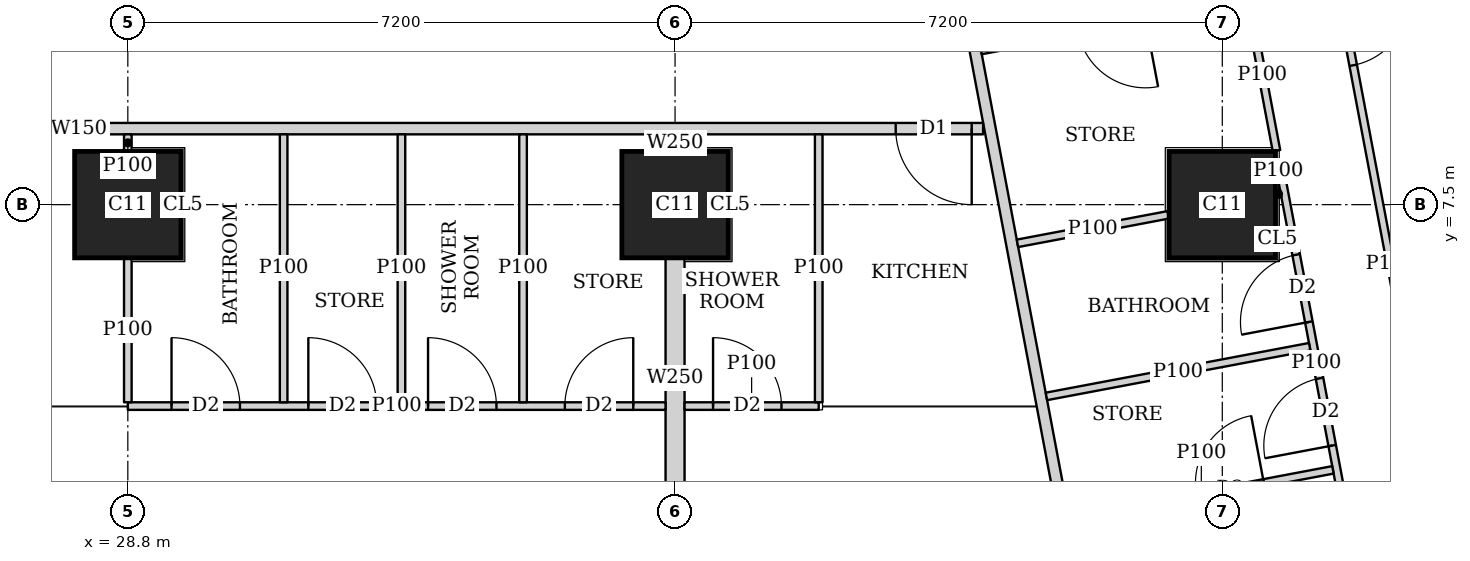
"""IFC4 building model, lengths in metres.
Left out: names, types, materials, properties, quantities, classifications, styles, units other than length and angle.
Written with IfcOpenShell. Run it as: python <this file> out.ifc"""

import sys

from ifc_helpers import new_model, si_unit, direction, frame, frame_2d, origin, origin_2d, place, context, subcontext, project, spatial, rectangle, extrude, element, fill, save


model = new_model("IFC4")
c1 = context("Model", 3, precision=1e-05, world=origin(), true_north=direction((0.0, 1.0)))
c2 = subcontext(c1, "Body", "Model", "MODEL_VIEW")
j1 = project(units=[si_unit("LENGTHUNIT", "METRE"), si_unit("PLANEANGLEUNIT", "RADIAN")], contexts=[c1])
p1 = place(None, origin())
s1 = spatial("IfcSite", under=j1, at=p1, CompositionType="ELEMENT")
p2 = place(p1, origin())
s2 = spatial("IfcBuilding", under=s1, at=p2, CompositionType="ELEMENT")
p3 = place(p2, frame((0.0, 0.0, 223.7)))
s3 = spatial("IfcBuildingStorey", under=s2, at=p3, CompositionType="ELEMENT", Elevation=223.7)
for number, where, z_axis, x_axis in (
    (1, (28.8, 7.5, 0.0), (0.0, 0.0, 1.0), (1.0, 0.0, 0.0)),
    (2, (36.0, 7.5, 0.0), (0.0, 0.0, 1.0), (1.0, 0.0, 0.0)),
    (3, (43.2, 7.5, 0.0), (0.0, 0.0, 1.0), (1.0, 0.0, 0.0)),
):
    element("IfcColumn", number, at=place(p3, frame(where, z_axis=z_axis, x_axis=x_axis)), inside=s3, PredefinedType="COLUMN", context=c2, shape_type="SweptSolid", body=[
        extrude(rectangle(XDim=1.4, YDim=1.4, at=origin_2d()), origin(), (0.0, 0.0, 1.0), 3.75),
    ])
p4 = place(p3, frame((50.653, 2.703, 0.0), z_axis=(0.0, 0.0, 1.0), x_axis=(-0.185612026696, 0.982623109613, 0.0)))
e4 = element("IfcWall", 4, at=p4, inside=s3, PredefinedType="SOLIDWALL", context=c2, shape_type="SweptSolid", body=[
    extrude(rectangle(XDim=41.393, YDim=0.2, at=frame_2d((20.697, 0.0))), origin(), (0.0, 0.0, 1.0), 3.5),
])
p5 = place(p4, frame((1.633, 0.0, 0.9)))
e5 = element("IfcOpeningElement", 5, at=p5, cuts=e4, PredefinedType="OPENING", context=c2, shape_type="SweptSolid", body=[
    extrude(rectangle(XDim=1.8, YDim=1.5, at=frame_2d((0.9, 0.75))), frame((0.0, 0.11, 0.0), z_axis=(0.0, -1.0, 0.0), x_axis=(1.0, 0.0, 0.0)), (0.0, 0.0, 1.0), 0.22),
])
p6 = place(p4, frame((6.032, 0.0, 0.9)))
e6 = element("IfcOpeningElement", 6, at=p6, cuts=e4, PredefinedType="OPENING", context=c2, shape_type="SweptSolid", body=[
    extrude(rectangle(XDim=1.8, YDim=1.5, at=frame_2d((0.9, 0.75))), frame((0.0, 0.11, 0.0), z_axis=(0.0, -1.0, 0.0), x_axis=(1.0, 0.0, 0.0)), (0.0, 0.0, 1.0), 0.22),
])
p7 = place(p4, frame((9.848, 0.0, 0.9)))
e7 = element("IfcOpeningElement", 7, at=p7, cuts=e4, PredefinedType="OPENING", context=c2, shape_type="SweptSolid", body=[
    extrude(rectangle(XDim=1.8, YDim=1.5, at=frame_2d((0.9, 0.75))), frame((0.0, 0.11, 0.0), z_axis=(0.0, -1.0, 0.0), x_axis=(1.0, 0.0, 0.0)), (0.0, 0.0, 1.0), 0.22),
])
p8 = place(p4, frame((13.664, 0.0, 0.9)))
e8 = element("IfcOpeningElement", 8, at=p8, cuts=e4, PredefinedType="OPENING", context=c2, shape_type="SweptSolid", body=[
    extrude(rectangle(XDim=1.8, YDim=1.5, at=frame_2d((0.9, 0.75))), frame((0.0, 0.11, 0.0), z_axis=(0.0, -1.0, 0.0), x_axis=(1.0, 0.0, 0.0)), (0.0, 0.0, 1.0), 0.22),
])
p9 = place(p4, frame((17.481, 0.0, 0.9)))
e9 = element("IfcOpeningElement", 9, at=p9, cuts=e4, PredefinedType="OPENING", context=c2, shape_type="SweptSolid", body=[
    extrude(rectangle(XDim=1.8, YDim=1.5, at=frame_2d((0.9, 0.75))), frame((0.0, 0.11, 0.0), z_axis=(0.0, -1.0, 0.0), x_axis=(1.0, 0.0, 0.0)), (0.0, 0.0, 1.0), 0.22),
])
p10 = place(p4, frame((21.297, 0.0, 0.9)))
e10 = element("IfcOpeningElement", 10, at=p10, cuts=e4, PredefinedType="OPENING", context=c2, shape_type="SweptSolid", body=[
    extrude(rectangle(XDim=1.8, YDim=1.5, at=frame_2d((0.9, 0.75))), frame((0.0, 0.11, 0.0), z_axis=(0.0, -1.0, 0.0), x_axis=(1.0, 0.0, 0.0)), (0.0, 0.0, 1.0), 0.22),
])
p11 = place(p4, frame((25.113, 0.0, 0.9)))
e11 = element("IfcOpeningElement", 11, at=p11, cuts=e4, PredefinedType="OPENING", context=c2, shape_type="SweptSolid", body=[
    extrude(rectangle(XDim=1.8, YDim=1.5, at=frame_2d((0.9, 0.75))), frame((0.0, 0.11, 0.0), z_axis=(0.0, -1.0, 0.0), x_axis=(1.0, 0.0, 0.0)), (0.0, 0.0, 1.0), 0.22),
])
p12 = place(p4, frame((28.93, 0.0, 0.9)))
e12 = element("IfcOpeningElement", 12, at=p12, cuts=e4, PredefinedType="OPENING", context=c2, shape_type="SweptSolid", body=[
    extrude(rectangle(XDim=1.8, YDim=1.5, at=frame_2d((0.9, 0.75))), frame((0.0, 0.11, 0.0), z_axis=(0.0, -1.0, 0.0), x_axis=(1.0, 0.0, 0.0)), (0.0, 0.0, 1.0), 0.22),
])
p13 = place(p4, frame((32.746, 0.0, 0.9)))
e13 = element("IfcOpeningElement", 13, at=p13, cuts=e4, PredefinedType="OPENING", context=c2, shape_type="SweptSolid", body=[
    extrude(rectangle(XDim=1.8, YDim=1.5, at=frame_2d((0.9, 0.75))), frame((0.0, 0.11, 0.0), z_axis=(0.0, -1.0, 0.0), x_axis=(1.0, 0.0, 0.0)), (0.0, 0.0, 1.0), 0.22),
])
p14 = place(p4, frame((36.481, 0.0, 0.9)))
e14 = element("IfcOpeningElement", 14, at=p14, cuts=e4, PredefinedType="OPENING", context=c2, shape_type="SweptSolid", body=[
    extrude(rectangle(XDim=1.8, YDim=1.5, at=frame_2d((0.9, 0.75))), frame((0.0, 0.11, 0.0), z_axis=(0.0, -1.0, 0.0), x_axis=(1.0, 0.0, 0.0)), (0.0, 0.0, 1.0), 0.22),
])
p15 = place(p3, frame((40.053, 8.5, 0.0), z_axis=(0.0, 0.0, 1.0), x_axis=(-1.0, 0.0, 0.0)))
e15 = element("IfcWall", 15, at=p15, inside=s3, PredefinedType="SOLIDWALL", context=c2, shape_type="SweptSolid", body=[
    extrude(rectangle(XDim=23.798, YDim=0.15, at=frame_2d((11.899, 0.0))), origin(), (0.0, 0.0, 1.0), 3.5),
])
p16 = place(p15, frame((21.978, 0.0, 0.0)))
e16 = element("IfcOpeningElement", 16, at=p16, cuts=e15, PredefinedType="OPENING", context=c2, shape_type="SweptSolid", body=[
    extrude(rectangle(XDim=1.0, YDim=2.1, at=frame_2d((0.5, 1.05))), frame((0.0, 0.085, 0.0), z_axis=(0.0, -1.0, 0.0), x_axis=(1.0, 0.0, 0.0)), (0.0, 0.0, 1.0), 0.17),
])
p17 = place(p15, frame((12.753, 0.0, 0.0)))
e17 = element("IfcOpeningElement", 17, at=p17, cuts=e15, PredefinedType="OPENING", context=c2, shape_type="SweptSolid", body=[
    extrude(rectangle(XDim=1.0, YDim=2.1, at=frame_2d((0.5, 1.05))), frame((0.0, 0.085, 0.0), z_axis=(0.0, -1.0, 0.0), x_axis=(1.0, 0.0, 0.0)), (0.0, 0.0, 1.0), 0.17),
])
p18 = place(p15, frame((0.15, 0.0, 0.0)))
e18 = element("IfcOpeningElement", 18, at=p18, cuts=e15, PredefinedType="OPENING", context=c2, shape_type="SweptSolid", body=[
    extrude(rectangle(XDim=1.0, YDim=2.1, at=frame_2d((0.5, 1.05))), frame((0.0, 0.085, 0.0), z_axis=(0.0, -1.0, 0.0), x_axis=(1.0, 0.0, 0.0)), (0.0, 0.0, 1.0), 0.17),
])
p19 = place(p3, frame((33.68, 42.723, 0.0), z_axis=(0.0, 0.0, 1.0), x_axis=(0.185601160014, -0.982625162207, 0.0)))
e19 = element("IfcWall", 19, at=p19, inside=s3, PredefinedType="SOLIDWALL", context=c2, shape_type="SweptSolid", body=[
    extrude(rectangle(XDim=41.051, YDim=0.15, at=frame_2d((20.526, 0.0))), origin(), (0.0, 0.0, 1.0), 2.5),
])
p20 = place(p19, frame((16.123, 0.0, 0.0)))
e20 = element("IfcOpeningElement", 20, at=p20, cuts=e19, PredefinedType="OPENING", context=c2, shape_type="SweptSolid", body=[
    extrude(rectangle(XDim=1.0, YDim=2.1, at=frame_2d((0.5, 1.05))), frame((0.0, 0.085, 0.0), z_axis=(0.0, -1.0, 0.0), x_axis=(1.0, 0.0, 0.0)), (0.0, 0.0, 1.0), 0.17),
])
p21 = place(p19, frame((19.938, 0.0, 0.0)))
e21 = element("IfcOpeningElement", 21, at=p21, cuts=e19, PredefinedType="OPENING", context=c2, shape_type="SweptSolid", body=[
    extrude(rectangle(XDim=1.0, YDim=2.1, at=frame_2d((0.5, 1.05))), frame((0.0, 0.085, 0.0), z_axis=(0.0, -1.0, 0.0), x_axis=(1.0, 0.0, 0.0)), (0.0, 0.0, 1.0), 0.17),
])
p22 = place(p19, frame((30.902, 0.0, 0.0)))
e22 = element("IfcOpeningElement", 22, at=p22, cuts=e19, PredefinedType="OPENING", context=c2, shape_type="SweptSolid", body=[
    extrude(rectangle(XDim=1.0, YDim=2.1, at=frame_2d((0.5, 1.05))), frame((0.0, 0.085, 0.0), z_axis=(0.0, -1.0, 0.0), x_axis=(1.0, 0.0, 0.0)), (0.0, 0.0, 1.0), 0.17),
])
p23 = place(p3, frame((35.875, 4.85, 0.0), z_axis=(0.0, 0.0, 1.0), x_axis=(-1.0, 0.0, 0.0)))
e23 = element("IfcWall", 23, at=p23, inside=s3, PredefinedType="PARTITIONING", context=c2, shape_type="SweptSolid", body=[
    extrude(rectangle(XDim=7.075, YDim=0.1, at=frame_2d((3.538, 0.0))), origin(), (0.0, 0.0, 1.0), 3.5),
])
p24 = place(p23, frame((5.6, 0.0, 0.0)))
e24 = element("IfcOpeningElement", 24, at=p24, cuts=e23, PredefinedType="OPENING", context=c2, shape_type="SweptSolid", body=[
    extrude(rectangle(XDim=0.9, YDim=2.1, at=frame_2d((0.45, 1.05))), frame((0.0, 0.06, 0.0), z_axis=(0.0, -1.0, 0.0), x_axis=(1.0, 0.0, 0.0)), (0.0, 0.0, 1.0), 0.12),
])
p25 = place(p23, frame((2.225, 0.0, 0.0)))
e25 = element("IfcOpeningElement", 25, at=p25, cuts=e23, PredefinedType="OPENING", context=c2, shape_type="SweptSolid", body=[
    extrude(rectangle(XDim=0.9, YDim=2.1, at=frame_2d((0.45, 1.05))), frame((0.0, 0.06, 0.0), z_axis=(0.0, -1.0, 0.0), x_axis=(1.0, 0.0, 0.0)), (0.0, 0.0, 1.0), 0.12),
])
p26 = place(p23, frame((3.8, 0.0, 0.0)))
e26 = element("IfcOpeningElement", 26, at=p26, cuts=e23, PredefinedType="OPENING", context=c2, shape_type="SweptSolid", body=[
    extrude(rectangle(XDim=0.9, YDim=2.1, at=frame_2d((0.45, 1.05))), frame((0.0, 0.06, 0.0), z_axis=(0.0, -1.0, 0.0), x_axis=(1.0, 0.0, 0.0)), (0.0, 0.0, 1.0), 0.12),
])
p27 = place(p23, frame((0.425, 0.0, 0.0)))
e27 = element("IfcOpeningElement", 27, at=p27, cuts=e23, PredefinedType="OPENING", context=c2, shape_type="SweptSolid", body=[
    extrude(rectangle(XDim=0.9, YDim=2.1, at=frame_2d((0.45, 1.05))), frame((0.0, 0.06, 0.0), z_axis=(0.0, -1.0, 0.0), x_axis=(1.0, 0.0, 0.0)), (0.0, 0.0, 1.0), 0.12),
])
p28 = place(p3, frame((28.8, 4.9, 0.0), z_axis=(0.0, 0.0, 1.0), x_axis=(0.0, 1.0, 0.0)))
e28 = element("IfcWall", 28, at=p28, inside=s3, PredefinedType="PARTITIONING", context=c2, shape_type="SweptSolid", body=[
    extrude(rectangle(XDim=1.899, YDim=0.1, at=frame_2d((0.95, 0.0))), origin(), (0.0, 0.0, 1.0), 3.5),
])
p29 = place(p3, frame((28.8, 8.201, 0.0), z_axis=(0.0, 0.0, 1.0), x_axis=(0.0, 1.0, 0.0)))
e29 = element("IfcWall", 29, at=p29, inside=s3, PredefinedType="PARTITIONING", context=c2, shape_type="SweptSolid", body=[
    extrude(rectangle(XDim=0.224, YDim=0.1, at=frame_2d((0.112, 0.0))), origin(), (0.0, 0.0, 1.0), 3.5),
])
for number, where, z_axis, x_axis in (
    (30, (32.4, 4.9, 0.0), (0.0, 0.0, 1.0), (0.0, 1.0, 0.0)),
    (31, (30.85, 4.9, 0.0), (0.0, 0.0, 1.0), (0.0, 1.0, 0.0)),
    (32, (34.0, 4.9, 0.0), (0.0, 0.0, 1.0), (0.0, 1.0, 0.0)),
):
    element("IfcWall", number, at=place(p3, frame(where, z_axis=z_axis, x_axis=x_axis)), inside=s3, PredefinedType="PARTITIONING", context=c2, shape_type="SweptSolid", body=[
        extrude(rectangle(XDim=3.525, YDim=0.1, at=frame_2d((1.763, 0.0))), origin(), (0.0, 0.0, 1.0), 3.5),
    ])
p30 = place(p3, frame((37.89, 4.85, 0.0), z_axis=(0.0, 0.0, 1.0), x_axis=(-1.0, 0.0, 0.0)))
e33 = element("IfcWall", 33, at=p30, inside=s3, PredefinedType="PARTITIONING", context=c2, shape_type="SweptSolid", body=[
    extrude(rectangle(XDim=1.765, YDim=0.1, at=frame_2d((0.882, 0.0))), origin(), (0.0, 0.0, 1.0), 3.5),
])
p31 = place(p30, frame((0.49, 0.0, 0.0)))
e34 = element("IfcOpeningElement", 34, at=p31, cuts=e33, PredefinedType="OPENING", context=c2, shape_type="SweptSolid", body=[
    extrude(rectangle(XDim=0.9, YDim=2.1, at=frame_2d((0.45, 1.05))), frame((0.0, 0.06, 0.0), z_axis=(0.0, -1.0, 0.0), x_axis=(1.0, 0.0, 0.0)), (0.0, 0.0, 1.0), 0.12),
])
p32 = place(p3, frame((37.89, 4.9, 0.0), z_axis=(0.0, 0.0, 1.0), x_axis=(0.0, 1.0, 0.0)))
e35 = element("IfcWall", 35, at=p32, inside=s3, PredefinedType="PARTITIONING", context=c2, shape_type="SweptSolid", body=[
    extrude(rectangle(XDim=3.525, YDim=0.1, at=frame_2d((1.763, 0.0))), origin(), (0.0, 0.0, 1.0), 3.5),
])
p33 = place(p3, frame((36.0, 3.65, 0.0), z_axis=(0.0, 0.0, 1.0), x_axis=(0.0, 1.0, 0.0)))
e36 = element("IfcWall", 36, at=p33, inside=s3, PredefinedType="SOLIDWALL", context=c2, shape_type="SweptSolid", body=[
    extrude(rectangle(XDim=3.149, YDim=0.25, at=frame_2d((1.575, 0.0))), origin(), (0.0, 0.0, 1.0), 3.5),
])
p34 = place(p3, frame((36.0, 8.201, 0.0), z_axis=(0.0, 0.0, 1.0), x_axis=(0.0, 1.0, 0.0)))
e37 = element("IfcWall", 37, at=p34, inside=s3, PredefinedType="SOLIDWALL", context=c2, shape_type="SweptSolid", body=[
    extrude(rectangle(XDim=0.224, YDim=0.25, at=frame_2d((0.112, 0.0))), origin(), (0.0, 0.0, 1.0), 3.5),
])
p35 = place(p3, frame((44.727, 10.366, 0.0), z_axis=(0.0, 0.0, 1.0), x_axis=(0.185678775129, -0.982610498858, 0.0)))
e38 = element("IfcWall", 38, at=p35, inside=s3, PredefinedType="PARTITIONING", context=c2, shape_type="SweptSolid", body=[
    extrude(rectangle(XDim=7.421, YDim=0.1, at=frame_2d((3.71, 0.0))), origin(), (0.0, 0.0, 1.0), 3.5),
])
p36 = place(p35, frame((0.151, 0.0, 0.0)))
e39 = element("IfcOpeningElement", 39, at=p36, cuts=e38, PredefinedType="OPENING", context=c2, shape_type="SweptSolid", body=[
    extrude(rectangle(XDim=0.9, YDim=2.1, at=frame_2d((0.45, 1.05))), frame((0.0, 0.06, 0.0), z_axis=(0.0, -1.0, 0.0), x_axis=(1.0, 0.0, 0.0)), (0.0, 0.0, 1.0), 0.12),
])
p37 = place(p35, frame((4.65, 0.0, 0.0)))
e40 = element("IfcOpeningElement", 40, at=p37, cuts=e38, PredefinedType="OPENING", context=c2, shape_type="SweptSolid", body=[
    extrude(rectangle(XDim=0.9, YDim=2.1, at=frame_2d((0.45, 1.05))), frame((0.0, 0.06, 0.0), z_axis=(0.0, -1.0, 0.0), x_axis=(1.0, 0.0, 0.0)), (0.0, 0.0, 1.0), 0.12),
])
p38 = place(p3, frame((43.539, 10.192, 0.0), z_axis=(0.0, 0.0, 1.0), x_axis=(0.185443145218, -0.982654995353, 0.0)))
e41 = element("IfcWall", 41, at=p38, inside=s3, PredefinedType="PARTITIONING", context=c2, shape_type="SweptSolid", body=[
    extrude(rectangle(XDim=2.017, YDim=0.1, at=frame_2d((1.008, 0.0))), origin(), (0.0, 0.0, 1.0), 3.5),
])
p39 = place(p3, frame((43.949, 8.02, 0.0), z_axis=(0.0, 0.0, 1.0), x_axis=(0.185656792073, -0.982614652627, 0.0)))
e42 = element("IfcWall", 42, at=p39, inside=s3, PredefinedType="PARTITIONING", context=c2, shape_type="SweptSolid", body=[
    extrude(rectangle(XDim=5.289, YDim=0.1, at=frame_2d((2.645, 0.0))), origin(), (0.0, 0.0, 1.0), 3.5),
])
p40 = place(p39, frame((1.2, 0.0, 0.0)))
e43 = element("IfcOpeningElement", 43, at=p40, cuts=e42, PredefinedType="OPENING", context=c2, shape_type="SweptSolid", body=[
    extrude(rectangle(XDim=0.9, YDim=2.1, at=frame_2d((0.45, 1.05))), frame((0.0, 0.06, 0.0), z_axis=(0.0, -1.0, 0.0), x_axis=(1.0, 0.0, 0.0)), (0.0, 0.0, 1.0), 0.12),
])
p41 = place(p39, frame((2.855, 0.0, 0.0)))
e44 = element("IfcOpeningElement", 44, at=p41, cuts=e42, PredefinedType="OPENING", context=c2, shape_type="SweptSolid", body=[
    extrude(rectangle(XDim=0.9, YDim=2.1, at=frame_2d((0.45, 1.05))), frame((0.0, 0.06, 0.0), z_axis=(0.0, -1.0, 0.0), x_axis=(1.0, 0.0, 0.0)), (0.0, 0.0, 1.0), 0.12),
])
p42 = place(p3, frame((43.49, 10.183, 0.0), z_axis=(0.0, 0.0, 1.0), x_axis=(-0.982588017646, -0.185797706064, 0.0)))
e45 = element("IfcWall", 45, at=p42, inside=s3, PredefinedType="PARTITIONING", context=c2, shape_type="SweptSolid", body=[
    extrude(rectangle(XDim=3.525, YDim=0.1, at=frame_2d((1.763, 0.0))), origin(), (0.0, 0.0, 1.0), 3.5),
])
p43 = place(p42, frame((1.325, 0.0, 0.0)))
e46 = element("IfcOpeningElement", 46, at=p43, cuts=e45, PredefinedType="OPENING", context=c2, shape_type="SweptSolid", body=[
    extrude(rectangle(XDim=0.9, YDim=2.1, at=frame_2d((0.45, 1.05))), frame((0.0, 0.06, 0.0), z_axis=(0.0, -1.0, 0.0), x_axis=(1.0, 0.0, 0.0)), (0.0, 0.0, 1.0), 0.12),
])
p44 = place(p3, frame((43.969, 7.646, 0.0), z_axis=(0.0, 0.0, 1.0), x_axis=(-0.983147034646, -0.182816597351, 0.0)))
e47 = element("IfcWall", 47, at=p44, inside=s3, PredefinedType="PARTITIONING", context=c2, shape_type="SweptSolid", body=[
    extrude(rectangle(XDim=0.06, YDim=0.1, at=frame_2d((0.03, 0.0))), origin(), (0.0, 0.0, 1.0), 3.5),
])
p45 = place(p3, frame((42.49, 7.366, 0.0), z_axis=(0.0, 0.0, 1.0), x_axis=(-0.982620917875, -0.185623629302, 0.0)))
e48 = element("IfcWall", 48, at=p45, inside=s3, PredefinedType="PARTITIONING", context=c2, shape_type="SweptSolid", body=[
    extrude(rectangle(XDim=2.02, YDim=0.1, at=frame_2d((1.01, 0.0))), origin(), (0.0, 0.0, 1.0), 3.5),
])
p46 = place(p3, frame((44.35, 5.631, 0.0), z_axis=(0.0, 0.0, 1.0), x_axis=(-0.982638553676, -0.185530247748, 0.0)))
e49 = element("IfcWall", 49, at=p46, inside=s3, PredefinedType="PARTITIONING", context=c2, shape_type="SweptSolid", body=[
    extrude(rectangle(XDim=3.525, YDim=0.1, at=frame_2d((1.763, 0.0))), origin(), (0.0, 0.0, 1.0), 3.5),
])
p47 = place(p3, frame((41.192, 3.356, 0.0), z_axis=(0.0, 0.0, 1.0), x_axis=(0.982588017646, 0.185797706064, 0.0)))
e50 = element("IfcWall", 50, at=p47, inside=s3, PredefinedType="PARTITIONING", context=c2, shape_type="SweptSolid", body=[
    extrude(rectangle(XDim=3.525, YDim=0.1, at=frame_2d((1.763, 0.0))), origin(), (0.0, 0.0, 1.0), 3.5),
])
p48 = place(p47, frame((1.7, 0.0, 0.0)))
e51 = element("IfcOpeningElement", 51, at=p48, cuts=e50, PredefinedType="OPENING", context=c2, shape_type="SweptSolid", body=[
    extrude(rectangle(XDim=0.9, YDim=2.1, at=frame_2d((0.45, 1.05))), frame((0.0, 0.06, 0.0), z_axis=(0.0, -1.0, 0.0), x_axis=(1.0, 0.0, 0.0)), (0.0, 0.0, 1.0), 0.12),
])
p49 = place(p24, origin())
e52 = element("IfcDoor", 52, at=p49, inside=s3, OperationType="SINGLE_SWING_LEFT", PredefinedType="DOOR", context=c2, shape_type="SweptSolid", body=[
    extrude(rectangle(XDim=0.9, YDim=2.1, at=frame_2d((0.45, 1.05))), frame((0.0, 0.025, 0.0), z_axis=(0.0, -1.0, 0.0), x_axis=(1.0, 0.0, 0.0)), (0.0, 0.0, 1.0), 0.05),
])
fill(e24, e52)
p50 = place(p25, origin())
e53 = element("IfcDoor", 53, at=p50, inside=s3, OperationType="SINGLE_SWING_LEFT", PredefinedType="DOOR", context=c2, shape_type="SweptSolid", body=[
    extrude(rectangle(XDim=0.9, YDim=2.1, at=frame_2d((0.45, 1.05))), frame((0.0, 0.025, 0.0), z_axis=(0.0, -1.0, 0.0), x_axis=(1.0, 0.0, 0.0)), (0.0, 0.0, 1.0), 0.05),
])
fill(e25, e53)
p51 = place(p26, origin())
e54 = element("IfcDoor", 54, at=p51, inside=s3, OperationType="SINGLE_SWING_LEFT", PredefinedType="DOOR", context=c2, shape_type="SweptSolid", body=[
    extrude(rectangle(XDim=0.9, YDim=2.1, at=frame_2d((0.45, 1.05))), frame((0.0, 0.025, 0.0), z_axis=(0.0, -1.0, 0.0), x_axis=(1.0, 0.0, 0.0)), (0.0, 0.0, 1.0), 0.05),
])
fill(e26, e54)
p52 = place(p27, origin())
e55 = element("IfcDoor", 55, at=p52, inside=s3, OperationType="SINGLE_SWING_RIGHT", PredefinedType="DOOR", context=c2, shape_type="SweptSolid", body=[
    extrude(rectangle(XDim=0.9, YDim=2.1, at=frame_2d((0.45, 1.05))), frame((0.0, 0.025, 0.0), z_axis=(0.0, -1.0, 0.0), x_axis=(1.0, 0.0, 0.0)), (0.0, 0.0, 1.0), 0.05),
])
fill(e27, e55)
p53 = place(p31, origin())
e56 = element("IfcDoor", 56, at=p53, inside=s3, OperationType="SINGLE_SWING_LEFT", PredefinedType="DOOR", context=c2, shape_type="SweptSolid", body=[
    extrude(rectangle(XDim=0.9, YDim=2.1, at=frame_2d((0.45, 1.05))), frame((0.0, 0.025, 0.0), z_axis=(0.0, -1.0, 0.0), x_axis=(1.0, 0.0, 0.0)), (0.0, 0.0, 1.0), 0.05),
])
fill(e34, e56)
p54 = place(p18, origin())
e57 = element("IfcDoor", 57, at=p54, inside=s3, OperationType="SINGLE_SWING_LEFT", PredefinedType="DOOR", context=c2, shape_type="SweptSolid", body=[
    extrude(rectangle(XDim=1.0, YDim=2.1, at=frame_2d((0.5, 1.05))), frame((0.0, 0.025, 0.0), z_axis=(0.0, -1.0, 0.0), x_axis=(1.0, 0.0, 0.0)), (0.0, 0.0, 1.0), 0.05),
])
fill(e18, e57)
p55 = place(p36, origin())
e58 = element("IfcDoor", 58, at=p55, inside=s3, OperationType="SINGLE_SWING_LEFT", PredefinedType="DOOR", context=c2, shape_type="SweptSolid", body=[
    extrude(rectangle(XDim=0.9, YDim=2.1, at=frame_2d((0.45, 1.05))), frame((0.0, 0.025, 0.0), z_axis=(0.0, -1.0, 0.0), x_axis=(1.0, 0.0, 0.0)), (0.0, 0.0, 1.0), 0.05),
])
fill(e39, e58)
p56 = place(p40, origin())
e59 = element("IfcDoor", 59, at=p56, inside=s3, OperationType="SINGLE_SWING_LEFT", PredefinedType="DOOR", context=c2, shape_type="SweptSolid", body=[
    extrude(rectangle(XDim=0.9, YDim=2.1, at=frame_2d((0.45, 1.05))), frame((0.0, 0.025, 0.0), z_axis=(0.0, -1.0, 0.0), x_axis=(1.0, 0.0, 0.0)), (0.0, 0.0, 1.0), 0.05),
])
fill(e43, e59)
p57 = place(p41, origin())
e60 = element("IfcDoor", 60, at=p57, inside=s3, OperationType="SINGLE_SWING_LEFT", PredefinedType="DOOR", context=c2, shape_type="SweptSolid", body=[
    extrude(rectangle(XDim=0.9, YDim=2.1, at=frame_2d((0.45, 1.05))), frame((0.0, 0.025, 0.0), z_axis=(0.0, -1.0, 0.0), x_axis=(1.0, 0.0, 0.0)), (0.0, 0.0, 1.0), 0.05),
])
fill(e44, e60)
p58 = place(p48, origin())
e61 = element("IfcDoor", 61, at=p58, inside=s3, OperationType="SINGLE_SWING_RIGHT", PredefinedType="DOOR", context=c2, shape_type="SweptSolid", body=[
    extrude(rectangle(XDim=0.9, YDim=2.1, at=frame_2d((0.45, 1.05))), frame((0.0, 0.025, 0.0), z_axis=(0.0, -1.0, 0.0), x_axis=(1.0, 0.0, 0.0)), (0.0, 0.0, 1.0), 0.05),
])
fill(e51, e61)
save(model, sys.argv[1])
